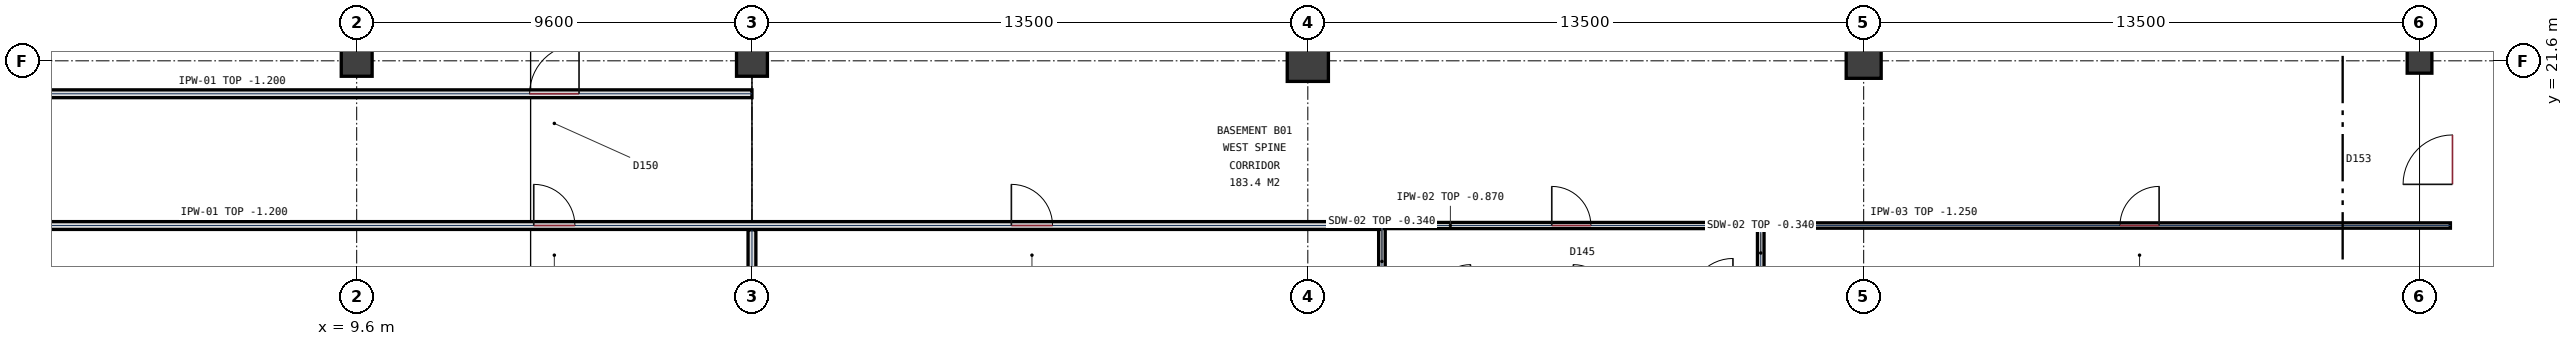
"""IFC4 building model, lengths in metres.
Left out: names, types, materials, properties, quantities, classifications, styles, units other than length and angle.
Written with IfcOpenShell. Run it as: python <this file> out.ifc"""

import sys

from ifc_helpers import new_model, si_unit, direction, frame, frame_2d, origin, origin_2d, place, context, subcontext, project, spatial, rectangle, extrude, element, fill, save


model = new_model("IFC4")
c1 = context("Model", 3, precision=1e-05, world=origin(), true_north=direction((0.0, 1.0)))
c2 = subcontext(c1, "Body", "Model", "MODEL_VIEW")
j1 = project(units=[si_unit("LENGTHUNIT", "METRE"), si_unit("PLANEANGLEUNIT", "RADIAN")], contexts=[c1])
p1 = place(None, origin())
s1 = spatial("IfcSite", under=j1, at=p1, CompositionType="ELEMENT")
p2 = place(p1, origin())
s2 = spatial("IfcBuilding", under=s1, at=p2, CompositionType="ELEMENT")
p3 = place(p2, frame((0.0, 0.0, -4.2)))
s3 = spatial("IfcBuildingStorey", under=s2, at=p3, CompositionType="ELEMENT", Elevation=-4.2)
for number, where, z_axis, x_axis in (
    (1, (9.6, 21.6, 0.0), (0.0, 0.0, 1.0), (1.0, 0.0, 0.0)),
    (2, (19.2, 21.6, 0.0), (0.0, 0.0, 1.0), (1.0, 0.0, 0.0)),
):
    element("IfcColumn", number, at=place(p3, frame(where, z_axis=z_axis, x_axis=x_axis)), inside=s3, PredefinedType="COLUMN", context=c2, shape_type="SweptSolid", body=[
        extrude(rectangle(XDim=0.75, YDim=0.75, at=origin_2d()), origin(), (0.0, 0.0, 1.0), 4.2),
    ])
p4 = place(p3, frame((32.7, 21.6, 0.0), z_axis=(0.0, 0.0, 1.0), x_axis=(1.0, 0.0, 0.0)))
e3 = element("IfcColumn", 3, at=p4, inside=s3, PredefinedType="COLUMN", context=c2, shape_type="SweptSolid", body=[
    extrude(rectangle(XDim=1.0, YDim=1.0, at=origin_2d()), origin(), (0.0, 0.0, 1.0), 4.2),
])
p5 = place(p3, frame((46.2, 21.6, 0.0), z_axis=(0.0, 0.0, 1.0), x_axis=(1.0, 0.0, 0.0)))
e4 = element("IfcColumn", 4, at=p5, inside=s3, PredefinedType="COLUMN", context=c2, shape_type="SweptSolid", body=[
    extrude(rectangle(XDim=0.85, YDim=0.85, at=origin_2d()), origin(), (0.0, 0.0, 1.0), 4.2),
])
p6 = place(p3, frame((59.7, 21.6, 0.0), z_axis=(0.0, 0.0, 1.0), x_axis=(1.0, 0.0, 0.0)))
e5 = element("IfcColumn", 5, at=p6, inside=s3, PredefinedType="COLUMN", context=c2, shape_type="SweptSolid", body=[
    extrude(rectangle(XDim=0.6, YDim=0.6, at=origin_2d()), origin(), (0.0, 0.0, 1.0), 4.2),
])
for number, where, z_axis, x_axis in (
    (6, (34.5, 15.855, 0.0), (0.0, 0.0, 1.0), (0.0, 1.0, 0.0)),
    (7, (43.7, 15.855, 0.0), (0.0, 0.0, 1.0), (0.0, 1.0, 0.0)),
):
    element("IfcWall", number, at=place(p3, frame(where, z_axis=z_axis, x_axis=x_axis)), inside=s3, PredefinedType="PLUMBINGWALL", context=c2, shape_type="SweptSolid", body=[
        extrude(rectangle(XDim=1.745, YDim=0.16, at=frame_2d((0.873, 0.0))), origin(), (0.0, 0.0, 1.0), 3.86),
    ])
p7 = place(p3, frame((0.203, 20.8, 0.0), z_axis=(0.0, 0.0, 1.0), x_axis=(1.0, 0.0, 0.0)))
e8 = element("IfcWall", 8, at=p7, inside=s3, PredefinedType="PARTITIONING", context=c2, shape_type="SweptSolid", body=[
    extrude(rectangle(XDim=18.997, YDim=0.19, at=frame_2d((9.499, 0.0))), origin(), (0.0, 0.0, 1.0), 3.0),
])
p8 = place(p7, frame((13.597, 0.0, 0.0)))
e9 = element("IfcOpeningElement", 9, at=p8, cuts=e8, PredefinedType="OPENING", context=c2, shape_type="SweptSolid", body=[
    extrude(rectangle(XDim=1.2, YDim=2.2, at=frame_2d((0.6, 1.1))), frame((0.0, 0.105, 0.0), z_axis=(0.0, -1.0, 0.0), x_axis=(1.0, 0.0, 0.0)), (0.0, 0.0, 1.0), 0.21),
])
p9 = place(p3, frame((60.5, 12.203, 0.0), z_axis=(0.0, 0.0, 1.0), x_axis=(0.0, 1.0, 0.0)))
e10 = element("IfcWall", 10, at=p9, inside=s3, PredefinedType="PARTITIONING", context=c2, shape_type="SweptSolid", body=[
    extrude(rectangle(XDim=35.594, YDim=0.19, at=frame_2d((17.797, 0.0))), origin(), (0.0, 0.0, 1.0), 2.85),
])
p10 = place(p9, frame((6.397, 0.0, 0.0)))
e11 = element("IfcOpeningElement", 11, at=p10, cuts=e10, PredefinedType="OPENING", context=c2, shape_type="SweptSolid", body=[
    extrude(rectangle(XDim=1.2, YDim=2.2, at=frame_2d((0.6, 1.1))), frame((0.0, 0.105, 0.0), z_axis=(0.0, -1.0, 0.0), x_axis=(1.0, 0.0, 0.0)), (0.0, 0.0, 1.0), 0.21),
])
p11 = place(p3, frame((0.203, 17.6, 0.0), z_axis=(0.0, 0.0, 1.0), x_axis=(1.0, 0.0, 0.0)))
e12 = element("IfcWall", 12, at=p11, inside=s3, PredefinedType="PARTITIONING", context=c2, shape_type="SweptSolid", body=[
    extrude(rectangle(XDim=34.247, YDim=0.19, at=frame_2d((17.124, 0.0))), origin(), (0.0, 0.0, 1.0), 3.0),
])
p12 = place(p11, frame((13.697, 0.0, 0.0)))
e13 = element("IfcOpeningElement", 13, at=p12, cuts=e12, PredefinedType="OPENING", context=c2, shape_type="SweptSolid", body=[
    extrude(rectangle(XDim=1.0, YDim=2.2, at=frame_2d((0.5, 1.1))), frame((0.0, 0.105, 0.0), z_axis=(0.0, -1.0, 0.0), x_axis=(1.0, 0.0, 0.0)), (0.0, 0.0, 1.0), 0.21),
])
p13 = place(p11, frame((25.297, 0.0, 0.0)))
e14 = element("IfcOpeningElement", 14, at=p13, cuts=e12, PredefinedType="OPENING", context=c2, shape_type="SweptSolid", body=[
    extrude(rectangle(XDim=1.0, YDim=2.2, at=frame_2d((0.5, 1.1))), frame((0.0, 0.105, 0.0), z_axis=(0.0, -1.0, 0.0), x_axis=(1.0, 0.0, 0.0)), (0.0, 0.0, 1.0), 0.21),
])
p14 = place(p3, frame((34.55, 17.6, 0.0), z_axis=(0.0, 0.0, 1.0), x_axis=(1.0, 0.0, 0.0)))
e15 = element("IfcWall", 15, at=p14, inside=s3, PredefinedType="PARTITIONING", context=c2, shape_type="SweptSolid", body=[
    extrude(rectangle(XDim=9.1, YDim=0.15, at=frame_2d((4.55, 0.0))), origin(), (0.0, 0.0, 1.0), 3.33),
])
p15 = place(p14, frame((4.075, 0.0, 0.0)))
e16 = element("IfcOpeningElement", 16, at=p15, cuts=e15, PredefinedType="OPENING", context=c2, shape_type="SweptSolid", body=[
    extrude(rectangle(XDim=0.95, YDim=2.15, at=frame_2d((0.475, 1.075))), frame((0.0, 0.085, 0.0), z_axis=(0.0, -1.0, 0.0), x_axis=(1.0, 0.0, 0.0)), (0.0, 0.0, 1.0), 0.17),
])
p16 = place(p3, frame((43.75, 17.6, 0.0), z_axis=(0.0, 0.0, 1.0), x_axis=(1.0, 0.0, 0.0)))
e17 = element("IfcWall", 17, at=p16, inside=s3, PredefinedType="PARTITIONING", context=c2, shape_type="SweptSolid", body=[
    extrude(rectangle(XDim=16.7, YDim=0.13, at=frame_2d((8.35, 0.0))), origin(), (0.0, 0.0, 1.0), 2.95),
])
p17 = place(p16, frame((8.675, 0.0, 0.0)))
e18 = element("IfcOpeningElement", 18, at=p17, cuts=e17, PredefinedType="OPENING", context=c2, shape_type="SweptSolid", body=[
    extrude(rectangle(XDim=0.95, YDim=2.15, at=frame_2d((0.475, 1.075))), frame((0.0, 0.075, 0.0), z_axis=(0.0, -1.0, 0.0), x_axis=(1.0, 0.0, 0.0)), (0.0, 0.0, 1.0), 0.15),
])
p18 = place(p3, frame((19.2, 12.403, 0.0), z_axis=(0.0, 0.0, 1.0), x_axis=(0.0, 1.0, 0.0)))
e19 = element("IfcWall", 19, at=p18, inside=s3, PredefinedType="PARTITIONING", context=c2, shape_type="SweptSolid", body=[
    extrude(rectangle(XDim=5.092, YDim=0.19, at=frame_2d((2.546, 0.0))), origin(), (0.0, 0.0, 1.0), 2.97),
])
p19 = place(p15, origin())
e20 = element("IfcDoor", 20, at=p19, inside=s3, OperationType="SINGLE_SWING_LEFT", PredefinedType="DOOR", context=c2, shape_type="SweptSolid", body=[
    extrude(rectangle(XDim=0.95, YDim=2.15, at=frame_2d((0.475, 1.075))), frame((0.0, 0.032, 0.0), z_axis=(0.0, -1.0, 0.0), x_axis=(1.0, 0.0, 0.0)), (0.0, 0.0, 1.0), 0.065),
])
fill(e16, e20)
p20 = place(p12, origin())
e21 = element("IfcDoor", 21, at=p20, inside=s3, OperationType="SINGLE_SWING_LEFT", PredefinedType="DOOR", context=c2, shape_type="SweptSolid", body=[
    extrude(rectangle(XDim=1.0, YDim=2.2, at=frame_2d((0.5, 1.1))), frame((0.0, 0.032, 0.0), z_axis=(0.0, -1.0, 0.0), x_axis=(1.0, 0.0, 0.0)), (0.0, 0.0, 1.0), 0.065),
])
fill(e13, e21)
p21 = place(p8, origin())
e22 = element("IfcDoor", 22, at=p21, inside=s3, OperationType="SINGLE_SWING_RIGHT", PredefinedType="DOOR", context=c2, shape_type="SweptSolid", body=[
    extrude(rectangle(XDim=1.2, YDim=2.2, at=frame_2d((0.6, 1.1))), frame((0.0, 0.032, 0.0), z_axis=(0.0, -1.0, 0.0), x_axis=(1.0, 0.0, 0.0)), (0.0, 0.0, 1.0), 0.065),
])
fill(e9, e22)
p22 = place(p13, origin())
e23 = element("IfcDoor", 23, at=p22, inside=s3, OperationType="SINGLE_SWING_LEFT", PredefinedType="DOOR", context=c2, shape_type="SweptSolid", body=[
    extrude(rectangle(XDim=1.0, YDim=2.2, at=frame_2d((0.5, 1.1))), frame((0.0, 0.032, 0.0), z_axis=(0.0, -1.0, 0.0), x_axis=(1.0, 0.0, 0.0)), (0.0, 0.0, 1.0), 0.065),
])
fill(e14, e23)
p23 = place(p17, origin())
e24 = element("IfcDoor", 24, at=p23, inside=s3, OperationType="SINGLE_SWING_RIGHT", PredefinedType="DOOR", context=c2, shape_type="SweptSolid", body=[
    extrude(rectangle(XDim=0.95, YDim=2.15, at=frame_2d((0.475, 1.075))), frame((0.0, 0.032, 0.0), z_axis=(0.0, -1.0, 0.0), x_axis=(1.0, 0.0, 0.0)), (0.0, 0.0, 1.0), 0.065),
])
fill(e18, e24)
p24 = place(p10, origin())
e25 = element("IfcDoor", 25, at=p24, inside=s3, OperationType="SINGLE_SWING_LEFT", PredefinedType="DOOR", context=c2, shape_type="SweptSolid", body=[
    extrude(rectangle(XDim=1.2, YDim=2.2, at=frame_2d((0.6, 1.1))), frame((0.0, 0.032, 0.0), z_axis=(0.0, -1.0, 0.0), x_axis=(1.0, 0.0, 0.0)), (0.0, 0.0, 1.0), 0.065),
])
fill(e11, e25)
save(model, sys.argv[1])
